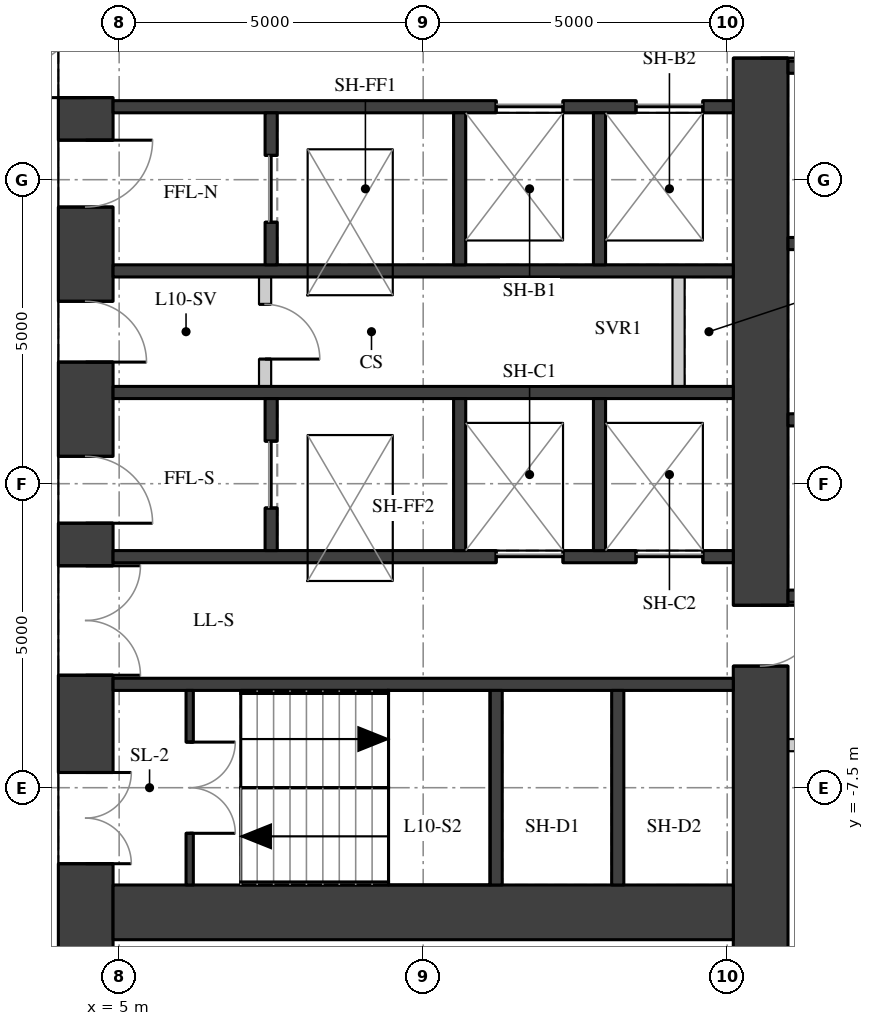
"""IFC4 building model, lengths in metres.
Left out: names, types, materials, properties, quantities, classifications, styles, units other than length and angle.
Written with IfcOpenShell. Run it as: python <this file> out.ifc"""

import sys

from ifc_helpers import new_model, si_unit, direction, frame, frame_2d, origin, place, context, subcontext, project, spatial, rectangle, extrude, element, fill, save


model = new_model("IFC4")
c1 = context("Model", 3, precision=1e-05, world=origin(), true_north=direction((0.0, 1.0)))
c2 = subcontext(c1, "Body", "Model", "MODEL_VIEW")
j1 = project(units=[si_unit("LENGTHUNIT", "METRE"), si_unit("PLANEANGLEUNIT", "RADIAN")], contexts=[c1])
p1 = place(None, origin())
s1 = spatial("IfcSite", under=j1, at=p1, CompositionType="ELEMENT")
p2 = place(p1, origin())
s2 = spatial("IfcBuilding", under=s1, at=p2, CompositionType="ELEMENT")
p3 = place(p2, frame((0.0, 0.0, 41.5)))
s3 = spatial("IfcBuildingStorey", under=s2, at=p3, CompositionType="ELEMENT", Elevation=41.5)
p4 = place(p3, frame((4.45, -11.1, 0.0), z_axis=(0.0, 0.0, 1.0), x_axis=(0.0, 1.0, 0.0)))
e1 = element("IfcWall", 1, at=p4, inside=s3, PredefinedType="SHEAR", context=c2, shape_type="SweptSolid", body=[
    extrude(rectangle(XDim=22.2, YDim=0.9, at=frame_2d((11.1, 0.0))), origin(), (0.0, 0.0, 1.0), 3.02),
])
p5 = place(p4, frame((2.35, 0.0, 0.0)))
e2 = element("IfcOpeningElement", 2, at=p5, cuts=e1, PredefinedType="OPENING", context=c2, shape_type="SweptSolid", body=[
    extrude(rectangle(XDim=1.5, YDim=2.1, at=frame_2d((0.75, 1.05))), frame((0.0, 0.46, 0.0), z_axis=(0.0, -1.0, 0.0), x_axis=(1.0, 0.0, 0.0)), (0.0, 0.0, 1.0), 0.92),
])
p6 = place(p4, frame((5.45, 0.0, 0.0)))
e3 = element("IfcOpeningElement", 3, at=p6, cuts=e1, PredefinedType="OPENING", context=c2, shape_type="SweptSolid", body=[
    extrude(rectangle(XDim=1.8, YDim=2.1, at=frame_2d((0.9, 1.05))), frame((0.0, 0.46, 0.0), z_axis=(0.0, -1.0, 0.0), x_axis=(1.0, 0.0, 0.0)), (0.0, 0.0, 1.0), 0.92),
])
p7 = place(p4, frame((7.95, 0.0, 0.0)))
e4 = element("IfcOpeningElement", 4, at=p7, cuts=e1, PredefinedType="OPENING", context=c2, shape_type="SweptSolid", body=[
    extrude(rectangle(XDim=1.1, YDim=2.1, at=frame_2d((0.55, 1.05))), frame((0.0, 0.46, 0.0), z_axis=(0.0, -1.0, 0.0), x_axis=(1.0, 0.0, 0.0)), (0.0, 0.0, 1.0), 0.92),
])
p8 = place(p4, frame((10.6, 0.0, 0.0)))
e5 = element("IfcOpeningElement", 5, at=p8, cuts=e1, PredefinedType="OPENING", context=c2, shape_type="SweptSolid", body=[
    extrude(rectangle(XDim=1.0, YDim=2.1, at=frame_2d((0.5, 1.05))), frame((0.0, 0.46, 0.0), z_axis=(0.0, -1.0, 0.0), x_axis=(1.0, 0.0, 0.0)), (0.0, 0.0, 1.0), 0.92),
])
p9 = place(p4, frame((13.15, 0.0, 0.0)))
e6 = element("IfcOpeningElement", 6, at=p9, cuts=e1, PredefinedType="OPENING", context=c2, shape_type="SweptSolid", body=[
    extrude(rectangle(XDim=1.1, YDim=2.1, at=frame_2d((0.55, 1.05))), frame((0.0, 0.46, 0.0), z_axis=(0.0, -1.0, 0.0), x_axis=(1.0, 0.0, 0.0)), (0.0, 0.0, 1.0), 0.92),
])
p10 = place(p4, frame((14.95, 0.0, 0.0)))
e7 = element("IfcOpeningElement", 7, at=p10, cuts=e1, PredefinedType="OPENING", context=c2, shape_type="SweptSolid", body=[
    extrude(rectangle(XDim=1.8, YDim=2.1, at=frame_2d((0.9, 1.05))), frame((0.0, 0.46, 0.0), z_axis=(0.0, -1.0, 0.0), x_axis=(1.0, 0.0, 0.0)), (0.0, 0.0, 1.0), 0.92),
])
p11 = place(p4, frame((18.35, 0.0, 0.0)))
e8 = element("IfcOpeningElement", 8, at=p11, cuts=e1, PredefinedType="OPENING", context=c2, shape_type="SweptSolid", body=[
    extrude(rectangle(XDim=1.5, YDim=2.1, at=frame_2d((0.75, 1.05))), frame((0.0, 0.46, 0.0), z_axis=(0.0, -1.0, 0.0), x_axis=(1.0, 0.0, 0.0)), (0.0, 0.0, 1.0), 0.92),
])
p12 = place(p3, frame((15.55, -11.1, 0.0), z_axis=(0.0, 0.0, 1.0), x_axis=(0.0, 1.0, 0.0)))
e9 = element("IfcWall", 9, at=p12, inside=s3, PredefinedType="SHEAR", context=c2, shape_type="SweptSolid", body=[
    extrude(rectangle(XDim=22.2, YDim=0.9, at=frame_2d((11.1, 0.0))), origin(), (0.0, 0.0, 1.0), 3.02),
])
p13 = place(p12, frame((15.6, 0.0, 0.0)))
e10 = element("IfcOpeningElement", 10, at=p13, cuts=e9, PredefinedType="OPENING", context=c2, shape_type="SweptSolid", body=[
    extrude(rectangle(XDim=1.0, YDim=2.1, at=frame_2d((0.5, 1.05))), frame((0.0, 0.46, 0.0), z_axis=(0.0, -1.0, 0.0), x_axis=(1.0, 0.0, 0.0)), (0.0, 0.0, 1.0), 0.92),
])
p14 = place(p12, frame((5.6, 0.0, 0.0)))
e11 = element("IfcOpeningElement", 11, at=p14, cuts=e9, PredefinedType="OPENING", context=c2, shape_type="SweptSolid", body=[
    extrude(rectangle(XDim=1.0, YDim=2.1, at=frame_2d((0.5, 1.05))), frame((0.0, 0.46, 0.0), z_axis=(0.0, -1.0, 0.0), x_axis=(1.0, 0.0, 0.0)), (0.0, 0.0, 1.0), 0.92),
])
p15 = place(p3, frame((4.9, -9.55, 0.0), z_axis=(0.0, 0.0, 1.0), x_axis=(1.0, 0.0, 0.0)))
e12 = element("IfcWall", 12, at=p15, inside=s3, PredefinedType="SHEAR", context=c2, shape_type="SweptSolid", body=[
    extrude(rectangle(XDim=10.2, YDim=0.9, at=frame_2d((5.1, 0.0))), origin(), (0.0, 0.0, 1.0), 3.02),
])
p16 = place(p3, frame((4.9, 3.7, 0.0), z_axis=(0.0, 0.0, 1.0), x_axis=(1.0, 0.0, 0.0)))
e13 = element("IfcWall", 13, at=p16, inside=s3, PredefinedType="SHEAR", context=c2, shape_type="SweptSolid", body=[
    extrude(rectangle(XDim=10.2, YDim=0.2, at=frame_2d((5.1, 0.0))), origin(), (0.0, 0.0, 1.0), 3.02),
])
p17 = place(p16, frame((6.3, 0.0, 0.0)))
e14 = element("IfcOpeningElement", 14, at=p17, cuts=e13, PredefinedType="OPENING", context=c2, shape_type="SweptSolid", body=[
    extrude(rectangle(XDim=1.1, YDim=2.1, at=frame_2d((0.55, 1.05))), frame((0.0, 0.11, 0.0), z_axis=(0.0, -1.0, 0.0), x_axis=(1.0, 0.0, 0.0)), (0.0, 0.0, 1.0), 0.22),
])
p18 = place(p16, frame((8.6, 0.0, 0.0)))
e15 = element("IfcOpeningElement", 15, at=p18, cuts=e13, PredefinedType="OPENING", context=c2, shape_type="SweptSolid", body=[
    extrude(rectangle(XDim=1.1, YDim=2.1, at=frame_2d((0.55, 1.05))), frame((0.0, 0.11, 0.0), z_axis=(0.0, -1.0, 0.0), x_axis=(1.0, 0.0, 0.0)), (0.0, 0.0, 1.0), 0.22),
])
for number, where, z_axis, x_axis in (
    (16, (4.9, 1.0, 0.0), (0.0, 0.0, 1.0), (1.0, 0.0, 0.0)),
    (17, (4.9, -1.0, 0.0), (0.0, 0.0, 1.0), (1.0, 0.0, 0.0)),
):
    element("IfcWall", number, at=place(p3, frame(where, z_axis=z_axis, x_axis=x_axis)), inside=s3, PredefinedType="SHEAR", context=c2, shape_type="SweptSolid", body=[
        extrude(rectangle(XDim=10.2, YDim=0.2, at=frame_2d((5.1, 0.0))), origin(), (0.0, 0.0, 1.0), 3.02),
    ])
p19 = place(p3, frame((4.9, -3.7, 0.0), z_axis=(0.0, 0.0, 1.0), x_axis=(1.0, 0.0, 0.0)))
e18 = element("IfcWall", 18, at=p19, inside=s3, PredefinedType="SHEAR", context=c2, shape_type="SweptSolid", body=[
    extrude(rectangle(XDim=10.2, YDim=0.2, at=frame_2d((5.1, 0.0))), origin(), (0.0, 0.0, 1.0), 3.02),
])
p20 = place(p19, frame((6.3, 0.0, 0.0)))
e19 = element("IfcOpeningElement", 19, at=p20, cuts=e18, PredefinedType="OPENING", context=c2, shape_type="SweptSolid", body=[
    extrude(rectangle(XDim=1.1, YDim=2.1, at=frame_2d((0.55, 1.05))), frame((0.0, 0.11, 0.0), z_axis=(0.0, -1.0, 0.0), x_axis=(1.0, 0.0, 0.0)), (0.0, 0.0, 1.0), 0.22),
])
p21 = place(p19, frame((8.6, 0.0, 0.0)))
e20 = element("IfcOpeningElement", 20, at=p21, cuts=e18, PredefinedType="OPENING", context=c2, shape_type="SweptSolid", body=[
    extrude(rectangle(XDim=1.1, YDim=2.1, at=frame_2d((0.55, 1.05))), frame((0.0, 0.11, 0.0), z_axis=(0.0, -1.0, 0.0), x_axis=(1.0, 0.0, 0.0)), (0.0, 0.0, 1.0), 0.22),
])
p22 = place(p3, frame((4.9, -5.8, 0.0), z_axis=(0.0, 0.0, 1.0), x_axis=(1.0, 0.0, 0.0)))
e21 = element("IfcWall", 21, at=p22, inside=s3, PredefinedType="SHEAR", context=c2, shape_type="SweptSolid", body=[
    extrude(rectangle(XDim=10.2, YDim=0.2, at=frame_2d((5.1, 0.0))), origin(), (0.0, 0.0, 1.0), 3.02),
])
for number, where, z_axis, x_axis in (
    (22, (11.2, -9.1, 0.0), (0.0, 0.0, 1.0), (0.0, 1.0, 0.0)),
    (23, (13.2, -9.1, 0.0), (0.0, 0.0, 1.0), (0.0, 1.0, 0.0)),
):
    element("IfcWall", number, at=place(p3, frame(where, z_axis=z_axis, x_axis=x_axis)), inside=s3, PredefinedType="SHEAR", context=c2, shape_type="SweptSolid", body=[
        extrude(rectangle(XDim=3.2, YDim=0.2, at=frame_2d((1.6, 0.0))), origin(), (0.0, 0.0, 1.0), 3.02),
    ])
p23 = place(p3, frame((7.5, 1.1, 0.0), z_axis=(0.0, 0.0, 1.0), x_axis=(0.0, 1.0, 0.0)))
e24 = element("IfcWall", 24, at=p23, inside=s3, PredefinedType="SHEAR", context=c2, shape_type="SweptSolid", body=[
    extrude(rectangle(XDim=2.5, YDim=0.2, at=frame_2d((1.25, 0.0))), origin(), (0.0, 0.0, 1.0), 3.02),
])
p24 = place(p23, frame((0.7, 0.0, 0.0)))
e25 = element("IfcOpeningElement", 25, at=p24, cuts=e24, PredefinedType="OPENING", context=c2, shape_type="SweptSolid", body=[
    extrude(rectangle(XDim=1.1, YDim=2.1, at=frame_2d((0.55, 1.05))), frame((0.0, 0.11, 0.0), z_axis=(0.0, -1.0, 0.0), x_axis=(1.0, 0.0, 0.0)), (0.0, 0.0, 1.0), 0.22),
])
p25 = place(p3, frame((7.5, -3.6, 0.0), z_axis=(0.0, 0.0, 1.0), x_axis=(0.0, 1.0, 0.0)))
e26 = element("IfcWall", 26, at=p25, inside=s3, PredefinedType="SHEAR", context=c2, shape_type="SweptSolid", body=[
    extrude(rectangle(XDim=2.5, YDim=0.2, at=frame_2d((1.25, 0.0))), origin(), (0.0, 0.0, 1.0), 3.02),
])
p26 = place(p25, frame((0.7, 0.0, 0.0)))
e27 = element("IfcOpeningElement", 27, at=p26, cuts=e26, PredefinedType="OPENING", context=c2, shape_type="SweptSolid", body=[
    extrude(rectangle(XDim=1.1, YDim=2.1, at=frame_2d((0.55, 1.05))), frame((0.0, 0.11, 0.0), z_axis=(0.0, -1.0, 0.0), x_axis=(1.0, 0.0, 0.0)), (0.0, 0.0, 1.0), 0.22),
])
for number, where, z_axis, x_axis in (
    (28, (10.6, 1.1, 0.0), (0.0, 0.0, 1.0), (0.0, 1.0, 0.0)),
    (29, (10.6, -3.6, 0.0), (0.0, 0.0, 1.0), (0.0, 1.0, 0.0)),
    (30, (12.9, 1.1, 0.0), (0.0, 0.0, 1.0), (0.0, 1.0, 0.0)),
    (31, (12.9, -3.6, 0.0), (0.0, 0.0, 1.0), (0.0, 1.0, 0.0)),
):
    element("IfcWall", number, at=place(p3, frame(where, z_axis=z_axis, x_axis=x_axis)), inside=s3, PredefinedType="SHEAR", context=c2, shape_type="SweptSolid", body=[
        extrude(rectangle(XDim=2.5, YDim=0.2, at=frame_2d((1.25, 0.0))), origin(), (0.0, 0.0, 1.0), 3.02),
    ])
p27 = place(p3, frame((6.16, -9.1, 0.0), z_axis=(0.0, 0.0, 1.0), x_axis=(0.0, 1.0, 0.0)))
e32 = element("IfcWall", 32, at=p27, inside=s3, PredefinedType="SHEAR", context=c2, shape_type="SweptSolid", body=[
    extrude(rectangle(XDim=3.2, YDim=0.12, at=frame_2d((1.6, 0.0))), origin(), (0.0, 0.0, 1.0), 3.02),
])
p28 = place(p27, frame((0.85, 0.0, 0.0)))
e33 = element("IfcOpeningElement", 33, at=p28, cuts=e32, PredefinedType="OPENING", context=c2, shape_type="SweptSolid", body=[
    extrude(rectangle(XDim=1.5, YDim=2.1, at=frame_2d((0.75, 1.05))), frame((0.0, 0.07, 0.0), z_axis=(0.0, -1.0, 0.0), x_axis=(1.0, 0.0, 0.0)), (0.0, 0.0, 1.0), 0.14),
])
p29 = place(p3, frame((7.4, -0.9, 0.0), z_axis=(0.0, 0.0, 1.0), x_axis=(0.0, 1.0, 0.0)))
e34 = element("IfcWall", 34, at=p29, inside=s3, PredefinedType="PARTITIONING", context=c2, shape_type="SweptSolid", body=[
    extrude(rectangle(XDim=1.8, YDim=0.2, at=frame_2d((0.9, 0.0))), origin(), (0.0, 0.0, 1.0), 3.02),
])
p30 = place(p29, frame((0.45, 0.0, 0.0)))
e35 = element("IfcOpeningElement", 35, at=p30, cuts=e34, PredefinedType="OPENING", context=c2, shape_type="SweptSolid", body=[
    extrude(rectangle(XDim=0.9, YDim=2.1, at=frame_2d((0.45, 1.05))), frame((0.0, 0.11, 0.0), z_axis=(0.0, -1.0, 0.0), x_axis=(1.0, 0.0, 0.0)), (0.0, 0.0, 1.0), 0.22),
])
p31 = place(p3, frame((14.2, -0.9, 0.0), z_axis=(0.0, 0.0, 1.0), x_axis=(0.0, 1.0, 0.0)))
e36 = element("IfcWall", 36, at=p31, inside=s3, PredefinedType="PARTITIONING", context=c2, shape_type="SweptSolid", body=[
    extrude(rectangle(XDim=1.8, YDim=0.2, at=frame_2d((0.9, 0.0))), origin(), (0.0, 0.0, 1.0), 3.02),
])
for number, where, z_axis, x_axis in (
    (37, (16.0, -4.35, 0.0), (0.0, 0.0, 1.0), (1.0, 0.0, 0.0)),
    (38, (16.0, -1.45, 0.0), (0.0, 0.0, 1.0), (1.0, 0.0, 0.0)),
    (39, (16.0, 1.45, 0.0), (0.0, 0.0, 1.0), (1.0, 0.0, 0.0)),
    (40, (16.0, 4.35, 0.0), (0.0, 0.0, 1.0), (1.0, 0.0, 0.0)),
):
    element("IfcWall", number, at=place(p3, frame(where, z_axis=z_axis, x_axis=x_axis)), inside=s3, PredefinedType="SHEAR", context=c2, shape_type="SweptSolid", body=[
        extrude(rectangle(XDim=2.3, YDim=0.2, at=frame_2d((1.15, 0.0))), origin(), (0.0, 0.0, 1.0), 3.02),
    ])
p32 = place(p3, frame((16.0, -6.8, 0.0), z_axis=(0.0, 0.0, 1.0), x_axis=(1.0, 0.0, 0.0)))
e41 = element("IfcWall", 41, at=p32, inside=s3, PredefinedType="PARTITIONING", context=c2, shape_type="SweptSolid", body=[
    extrude(rectangle(XDim=2.3, YDim=0.2, at=frame_2d((1.15, 0.0))), origin(), (0.0, 0.0, 1.0), 3.02),
])
p33 = place(p32, frame((0.2, 0.0, 0.0)))
e42 = element("IfcOpeningElement", 42, at=p33, cuts=e41, PredefinedType="OPENING", context=c2, shape_type="SweptSolid", body=[
    extrude(rectangle(XDim=0.9, YDim=2.1, at=frame_2d((0.45, 1.05))), frame((0.0, 0.11, 0.0), z_axis=(0.0, -1.0, 0.0), x_axis=(1.0, 0.0, 0.0)), (0.0, 0.0, 1.0), 0.22),
])
p34 = place(p5, origin())
e43 = element("IfcDoor", 43, at=p34, inside=s3, OperationType="DOUBLE_DOOR_SINGLE_SWING", PredefinedType="DOOR", context=c2, shape_type="SweptSolid", body=[
    extrude(rectangle(XDim=1.5, YDim=2.1, at=frame_2d((0.75, 1.05))), frame((0.0, 0.025, 0.0), z_axis=(0.0, -1.0, 0.0), x_axis=(1.0, 0.0, 0.0)), (0.0, 0.0, 1.0), 0.05),
])
fill(e2, e43)
p35 = place(p6, origin())
e44 = element("IfcDoor", 44, at=p35, inside=s3, OperationType="DOUBLE_DOOR_SINGLE_SWING", PredefinedType="DOOR", context=c2, shape_type="SweptSolid", body=[
    extrude(rectangle(XDim=1.8, YDim=2.1, at=frame_2d((0.9, 1.05))), frame((0.0, 0.025, 0.0), z_axis=(0.0, -1.0, 0.0), x_axis=(1.0, 0.0, 0.0)), (0.0, 0.0, 1.0), 0.05),
])
fill(e3, e44)
p36 = place(p7, origin())
e45 = element("IfcDoor", 45, at=p36, inside=s3, OperationType="SINGLE_SWING_RIGHT", PredefinedType="DOOR", context=c2, shape_type="SweptSolid", body=[
    extrude(rectangle(XDim=1.1, YDim=2.1, at=frame_2d((0.55, 1.05))), frame((0.0, 0.025, 0.0), z_axis=(0.0, -1.0, 0.0), x_axis=(1.0, 0.0, 0.0)), (0.0, 0.0, 1.0), 0.05),
])
fill(e4, e45)
p37 = place(p8, origin())
e46 = element("IfcDoor", 46, at=p37, inside=s3, OperationType="SINGLE_SWING_RIGHT", PredefinedType="DOOR", context=c2, shape_type="SweptSolid", body=[
    extrude(rectangle(XDim=1.0, YDim=2.1, at=frame_2d((0.5, 1.05))), frame((0.0, 0.025, 0.0), z_axis=(0.0, -1.0, 0.0), x_axis=(1.0, 0.0, 0.0)), (0.0, 0.0, 1.0), 0.05),
])
fill(e5, e46)
p38 = place(p9, origin())
e47 = element("IfcDoor", 47, at=p38, inside=s3, OperationType="SINGLE_SWING_LEFT", PredefinedType="DOOR", context=c2, shape_type="SweptSolid", body=[
    extrude(rectangle(XDim=1.1, YDim=2.1, at=frame_2d((0.55, 1.05))), frame((0.0, 0.025, 0.0), z_axis=(0.0, -1.0, 0.0), x_axis=(1.0, 0.0, 0.0)), (0.0, 0.0, 1.0), 0.05),
])
fill(e6, e47)
p39 = place(p10, origin())
e48 = element("IfcDoor", 48, at=p39, inside=s3, OperationType="DOUBLE_DOOR_SINGLE_SWING", PredefinedType="DOOR", context=c2, shape_type="SweptSolid", body=[
    extrude(rectangle(XDim=1.8, YDim=2.1, at=frame_2d((0.9, 1.05))), frame((0.0, 0.025, 0.0), z_axis=(0.0, -1.0, 0.0), x_axis=(1.0, 0.0, 0.0)), (0.0, 0.0, 1.0), 0.05),
])
fill(e7, e48)
p40 = place(p28, origin())
e49 = element("IfcDoor", 49, at=p40, inside=s3, OperationType="DOUBLE_DOOR_SINGLE_SWING", PredefinedType="DOOR", context=c2, shape_type="SweptSolid", body=[
    extrude(rectangle(XDim=1.5, YDim=2.1, at=frame_2d((0.75, 1.05))), frame((0.0, 0.025, 0.0), z_axis=(0.0, -1.0, 0.0), x_axis=(1.0, 0.0, 0.0)), (0.0, 0.0, 1.0), 0.05),
])
fill(e33, e49)
p41 = place(p17, origin())
e50 = element("IfcDoor", 50, at=p41, inside=s3, OperationType="DOUBLE_DOOR_SLIDING", PredefinedType="DOOR", context=c2, shape_type="SweptSolid", body=[
    extrude(rectangle(XDim=1.1, YDim=2.1, at=frame_2d((0.55, 1.05))), frame((0.0, 0.025, 0.0), z_axis=(0.0, -1.0, 0.0), x_axis=(1.0, 0.0, 0.0)), (0.0, 0.0, 1.0), 0.05),
])
fill(e14, e50)
p42 = place(p18, origin())
e51 = element("IfcDoor", 51, at=p42, inside=s3, OperationType="DOUBLE_DOOR_SLIDING", PredefinedType="DOOR", context=c2, shape_type="SweptSolid", body=[
    extrude(rectangle(XDim=1.1, YDim=2.1, at=frame_2d((0.55, 1.05))), frame((0.0, 0.025, 0.0), z_axis=(0.0, -1.0, 0.0), x_axis=(1.0, 0.0, 0.0)), (0.0, 0.0, 1.0), 0.05),
])
fill(e15, e51)
p43 = place(p20, origin())
e52 = element("IfcDoor", 52, at=p43, inside=s3, OperationType="DOUBLE_DOOR_SLIDING", PredefinedType="DOOR", context=c2, shape_type="SweptSolid", body=[
    extrude(rectangle(XDim=1.1, YDim=2.1, at=frame_2d((0.55, 1.05))), frame((0.0, 0.025, 0.0), z_axis=(0.0, -1.0, 0.0), x_axis=(1.0, 0.0, 0.0)), (0.0, 0.0, 1.0), 0.05),
])
fill(e19, e52)
p44 = place(p21, origin())
e53 = element("IfcDoor", 53, at=p44, inside=s3, OperationType="DOUBLE_DOOR_SLIDING", PredefinedType="DOOR", context=c2, shape_type="SweptSolid", body=[
    extrude(rectangle(XDim=1.1, YDim=2.1, at=frame_2d((0.55, 1.05))), frame((0.0, 0.025, 0.0), z_axis=(0.0, -1.0, 0.0), x_axis=(1.0, 0.0, 0.0)), (0.0, 0.0, 1.0), 0.05),
])
fill(e20, e53)
p45 = place(p24, origin())
e54 = element("IfcDoor", 54, at=p45, inside=s3, OperationType="DOUBLE_DOOR_SLIDING", PredefinedType="DOOR", context=c2, shape_type="SweptSolid", body=[
    extrude(rectangle(XDim=1.1, YDim=2.1, at=frame_2d((0.55, 1.05))), frame((0.0, 0.025, 0.0), z_axis=(0.0, -1.0, 0.0), x_axis=(1.0, 0.0, 0.0)), (0.0, 0.0, 1.0), 0.05),
])
fill(e25, e54)
p46 = place(p26, origin())
e55 = element("IfcDoor", 55, at=p46, inside=s3, OperationType="DOUBLE_DOOR_SLIDING", PredefinedType="DOOR", context=c2, shape_type="SweptSolid", body=[
    extrude(rectangle(XDim=1.1, YDim=2.1, at=frame_2d((0.55, 1.05))), frame((0.0, 0.025, 0.0), z_axis=(0.0, -1.0, 0.0), x_axis=(1.0, 0.0, 0.0)), (0.0, 0.0, 1.0), 0.05),
])
fill(e27, e55)
p47 = place(p30, origin())
e56 = element("IfcDoor", 56, at=p47, inside=s3, OperationType="SINGLE_SWING_RIGHT", PredefinedType="DOOR", context=c2, shape_type="SweptSolid", body=[
    extrude(rectangle(XDim=0.9, YDim=2.1, at=frame_2d((0.45, 1.05))), frame((0.0, 0.025, 0.0), z_axis=(0.0, -1.0, 0.0), x_axis=(1.0, 0.0, 0.0)), (0.0, 0.0, 1.0), 0.05),
])
fill(e35, e56)
p48 = place(p13, origin())
e57 = element("IfcDoor", 57, at=p48, inside=s3, OperationType="SINGLE_SWING_RIGHT", PredefinedType="DOOR", context=c2, shape_type="SweptSolid", body=[
    extrude(rectangle(XDim=1.0, YDim=2.1, at=frame_2d((0.5, 1.05))), frame((0.0, 0.025, 0.0), z_axis=(0.0, -1.0, 0.0), x_axis=(1.0, 0.0, 0.0)), (0.0, 0.0, 1.0), 0.05),
])
fill(e10, e57)
p49 = place(p14, origin())
e58 = element("IfcDoor", 58, at=p49, inside=s3, OperationType="SINGLE_SWING_LEFT", PredefinedType="DOOR", context=c2, shape_type="SweptSolid", body=[
    extrude(rectangle(XDim=1.0, YDim=2.1, at=frame_2d((0.5, 1.05))), frame((0.0, 0.025, 0.0), z_axis=(0.0, -1.0, 0.0), x_axis=(1.0, 0.0, 0.0)), (0.0, 0.0, 1.0), 0.05),
])
fill(e11, e58)
save(model, sys.argv[1])
